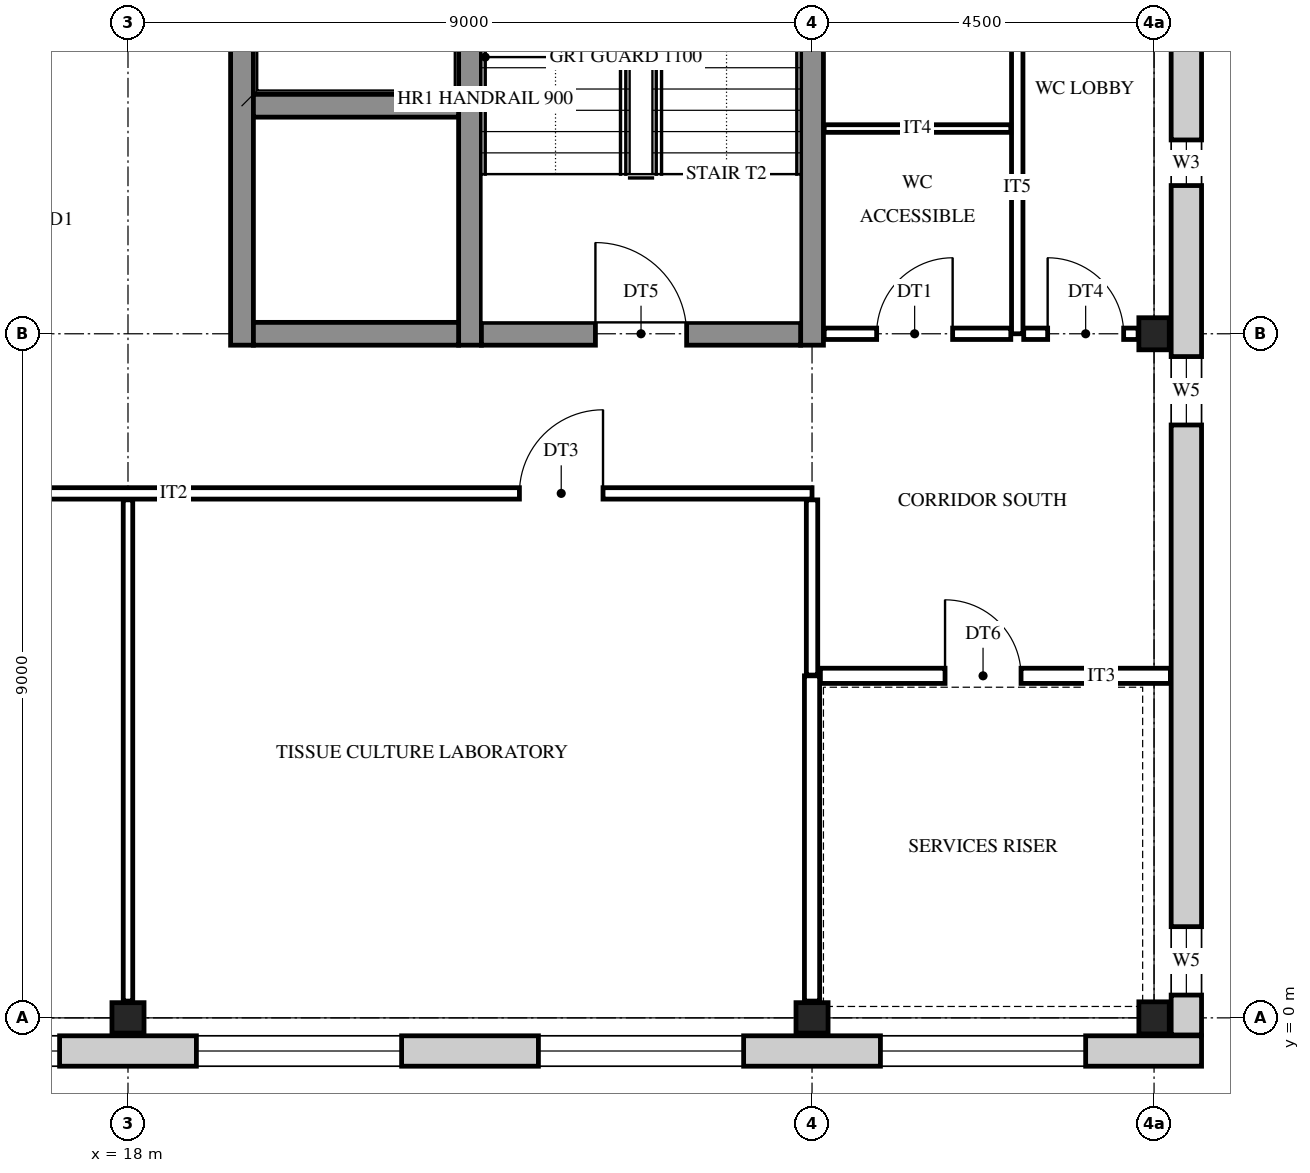
"""IFC4 building model, lengths in metres.
Left out: names, types, materials, properties, quantities, classifications, styles, units other than length and angle.
Written with IfcOpenShell. Run it as: python <this file> out.ifc"""

import sys

from ifc_helpers import new_model, si_unit, direction, frame, frame_2d, origin, origin_2d, place, context, subcontext, project, spatial, rectangle, i_section, extrude, element, fill, save


model = new_model("IFC4")
c1 = context("Model", 3, precision=1e-05, world=origin(), true_north=direction((0.0, 1.0)))
c2 = subcontext(c1, "Body", "Model", "MODEL_VIEW")
j1 = project(units=[si_unit("LENGTHUNIT", "METRE"), si_unit("PLANEANGLEUNIT", "RADIAN")], contexts=[c1])
p1 = place(None, origin())
s1 = spatial("IfcSite", under=j1, at=p1, CompositionType="ELEMENT")
p2 = place(p1, origin())
s2 = spatial("IfcBuilding", under=s1, at=p2, CompositionType="ELEMENT")
p3 = place(p2, frame((0.0, 0.0, 15.0)))
s3 = spatial("IfcBuildingStorey", under=s2, at=p3, CompositionType="ELEMENT", Elevation=15.0)
for number, where, z_axis, x_axis in (
    (1, (18.0, 0.0, 0.0), (0.0, 0.0, 1.0), (0.0, 1.0, 0.0)),
    (2, (27.0, 0.0, 0.0), (0.0, 0.0, 1.0), (0.0, 1.0, 0.0)),
    (3, (31.5, 0.0, 0.0), (0.0, 0.0, 1.0), (1.0, 0.0, 0.0)),
    (4, (31.5, 9.0, 0.0), (0.0, 0.0, 1.0), (1.0, 0.0, 0.0)),
):
    element("IfcColumn", number, at=place(p3, frame(where, z_axis=z_axis, x_axis=x_axis)), inside=s3, PredefinedType="COLUMN", context=c2, shape_type="SweptSolid", body=[
        extrude(i_section(OverallWidth=0.4, OverallDepth=0.422, WebThickness=0.028, FlangeThickness=0.036, at=origin_2d()), origin(), (0.0, 0.0, 1.0), 4.2),
    ])
p4 = place(p3, frame((19.5, 8.85, 0.0), z_axis=(0.0, 0.0, 1.0), x_axis=(0.0, 1.0, 0.0)))
e5 = element("IfcWall", 5, at=p4, inside=s3, PredefinedType="SHEAR", context=c2, shape_type="SweptSolid", body=[
    extrude(rectangle(XDim=9.3, YDim=0.3, at=frame_2d((4.65, 0.0))), origin(), (0.0, 0.0, 1.0), 4.2),
])
p5 = place(p4, frame((3.95, 0.0, 0.0)))
e6 = element("IfcOpeningElement", 6, at=p5, cuts=e5, PredefinedType="OPENING", context=c2, shape_type="SweptSolid", body=[
    extrude(rectangle(XDim=1.4, YDim=2.1, at=frame_2d((0.7, 1.05))), frame((0.0, 0.16, 0.0), z_axis=(0.0, -1.0, 0.0), x_axis=(1.0, 0.0, 0.0)), (0.0, 0.0, 1.0), 0.32),
])
p6 = place(p4, frame((7.1, 0.0, 0.0)))
e7 = element("IfcOpeningElement", 7, at=p6, cuts=e5, PredefinedType="OPENING", context=c2, shape_type="SweptSolid", body=[
    extrude(rectangle(XDim=1.1, YDim=2.1, at=frame_2d((0.55, 1.05))), frame((0.0, 0.16, 0.0), z_axis=(0.0, -1.0, 0.0), x_axis=(1.0, 0.0, 0.0)), (0.0, 0.0, 1.0), 0.32),
])
for number, where, z_axis, x_axis in (
    (8, (22.5, 8.85, 0.0), (0.0, 0.0, 1.0), (0.0, 1.0, 0.0)),
    (9, (27.0, 8.85, 0.0), (0.0, 0.0, 1.0), (0.0, 1.0, 0.0)),
):
    element("IfcWall", number, at=place(p3, frame(where, z_axis=z_axis, x_axis=x_axis)), inside=s3, PredefinedType="SHEAR", context=c2, shape_type="SweptSolid", body=[
        extrude(rectangle(XDim=9.3, YDim=0.3, at=frame_2d((4.65, 0.0))), origin(), (0.0, 0.0, 1.0), 4.2),
    ])
p7 = place(p3, frame((19.65, 9.0, 0.0), z_axis=(0.0, 0.0, 1.0), x_axis=(1.0, 0.0, 0.0)))
e10 = element("IfcWall", 10, at=p7, inside=s3, PredefinedType="SHEAR", context=c2, shape_type="SweptSolid", body=[
    extrude(rectangle(XDim=2.7, YDim=0.3, at=frame_2d((1.35, 0.0))), origin(), (0.0, 0.0, 1.0), 4.2),
])
p8 = place(p3, frame((22.65, 9.0, 0.0), z_axis=(0.0, 0.0, 1.0), x_axis=(1.0, 0.0, 0.0)))
e11 = element("IfcWall", 11, at=p8, inside=s3, PredefinedType="SHEAR", context=c2, shape_type="SweptSolid", body=[
    extrude(rectangle(XDim=4.2, YDim=0.3, at=frame_2d((2.1, 0.0))), origin(), (0.0, 0.0, 1.0), 4.2),
])
p9 = place(p8, frame((1.5, 0.0, 0.0)))
e12 = element("IfcOpeningElement", 12, at=p9, cuts=e11, PredefinedType="OPENING", context=c2, shape_type="SweptSolid", body=[
    extrude(rectangle(XDim=1.2, YDim=2.1, at=frame_2d((0.6, 1.05))), frame((0.0, 0.16, 0.0), z_axis=(0.0, -1.0, 0.0), x_axis=(1.0, 0.0, 0.0)), (0.0, 0.0, 1.0), 0.32),
])
p10 = place(p3, frame((19.65, 12.0, 0.0), z_axis=(0.0, 0.0, 1.0), x_axis=(1.0, 0.0, 0.0)))
e13 = element("IfcWall", 13, at=p10, inside=s3, PredefinedType="SHEAR", context=c2, shape_type="SweptSolid", body=[
    extrude(rectangle(XDim=2.7, YDim=0.3, at=frame_2d((1.35, 0.0))), origin(), (0.0, 0.0, 1.0), 4.2),
])
p11 = place(p3, frame((32.125, -0.436, 0.0), z_axis=(0.0, 0.0, 1.0), x_axis=(-1.0, 0.0, 0.0)))
e14 = element("IfcWall", 14, at=p11, inside=s3, PredefinedType="STANDARD", context=c2, shape_type="SweptSolid", body=[
    extrude(rectangle(XDim=32.75, YDim=0.4, at=frame_2d((16.375, 0.0))), origin(), (0.0, 0.0, 1.0), 4.2),
])
p12 = place(p11, frame((28.525, 0.0, 0.9)))
e15 = element("IfcOpeningElement", 15, at=p12, cuts=e14, PredefinedType="OPENING", context=c2, shape_type="SweptSolid", body=[
    extrude(rectangle(XDim=2.7, YDim=2.5, at=frame_2d((1.35, 1.25))), frame((0.0, 0.21, 0.0), z_axis=(0.0, -1.0, 0.0), x_axis=(1.0, 0.0, 0.0)), (0.0, 0.0, 1.0), 0.42),
])
p13 = place(p11, frame((24.025, 0.0, 0.9)))
e16 = element("IfcOpeningElement", 16, at=p13, cuts=e14, PredefinedType="OPENING", context=c2, shape_type="SweptSolid", body=[
    extrude(rectangle(XDim=2.7, YDim=2.5, at=frame_2d((1.35, 1.25))), frame((0.0, 0.21, 0.0), z_axis=(0.0, -1.0, 0.0), x_axis=(1.0, 0.0, 0.0)), (0.0, 0.0, 1.0), 0.42),
])
p14 = place(p11, frame((19.525, 0.0, 0.9)))
e17 = element("IfcOpeningElement", 17, at=p14, cuts=e14, PredefinedType="OPENING", context=c2, shape_type="SweptSolid", body=[
    extrude(rectangle(XDim=2.7, YDim=2.5, at=frame_2d((1.35, 1.25))), frame((0.0, 0.21, 0.0), z_axis=(0.0, -1.0, 0.0), x_axis=(1.0, 0.0, 0.0)), (0.0, 0.0, 1.0), 0.42),
])
p15 = place(p11, frame((15.025, 0.0, 0.9)))
e18 = element("IfcOpeningElement", 18, at=p15, cuts=e14, PredefinedType="OPENING", context=c2, shape_type="SweptSolid", body=[
    extrude(rectangle(XDim=2.7, YDim=2.5, at=frame_2d((1.35, 1.25))), frame((0.0, 0.21, 0.0), z_axis=(0.0, -1.0, 0.0), x_axis=(1.0, 0.0, 0.0)), (0.0, 0.0, 1.0), 0.42),
])
p16 = place(p11, frame((10.525, 0.0, 0.9)))
e19 = element("IfcOpeningElement", 19, at=p16, cuts=e14, PredefinedType="OPENING", context=c2, shape_type="SweptSolid", body=[
    extrude(rectangle(XDim=2.7, YDim=2.5, at=frame_2d((1.35, 1.25))), frame((0.0, 0.21, 0.0), z_axis=(0.0, -1.0, 0.0), x_axis=(1.0, 0.0, 0.0)), (0.0, 0.0, 1.0), 0.42),
])
p17 = place(p11, frame((6.025, 0.0, 0.9)))
e20 = element("IfcOpeningElement", 20, at=p17, cuts=e14, PredefinedType="OPENING", context=c2, shape_type="SweptSolid", body=[
    extrude(rectangle(XDim=2.7, YDim=2.5, at=frame_2d((1.35, 1.25))), frame((0.0, 0.21, 0.0), z_axis=(0.0, -1.0, 0.0), x_axis=(1.0, 0.0, 0.0)), (0.0, 0.0, 1.0), 0.42),
])
p18 = place(p11, frame((1.525, 0.0, 0.9)))
e21 = element("IfcOpeningElement", 21, at=p18, cuts=e14, PredefinedType="OPENING", context=c2, shape_type="SweptSolid", body=[
    extrude(rectangle(XDim=2.7, YDim=2.5, at=frame_2d((1.35, 1.25))), frame((0.0, 0.21, 0.0), z_axis=(0.0, -1.0, 0.0), x_axis=(1.0, 0.0, 0.0)), (0.0, 0.0, 1.0), 0.42),
])
p19 = place(p3, frame((31.925, 27.225, 0.0), z_axis=(0.0, 0.0, 1.0), x_axis=(0.0, -1.0, 0.0)))
e22 = element("IfcWall", 22, at=p19, inside=s3, PredefinedType="STANDARD", context=c2, shape_type="SweptSolid", body=[
    extrude(rectangle(XDim=27.45, YDim=0.4, at=frame_2d((13.725, 0.0))), origin(), (0.0, 0.0, 1.0), 4.2),
])
p20 = place(p19, frame((26.025, 0.0, 0.9)))
e23 = element("IfcOpeningElement", 23, at=p20, cuts=e22, PredefinedType="OPENING", context=c2, shape_type="SweptSolid", body=[
    extrude(rectangle(XDim=0.9, YDim=2.0, at=frame_2d((0.45, 1.0))), frame((0.0, 0.21, 0.0), z_axis=(0.0, -1.0, 0.0), x_axis=(1.0, 0.0, 0.0)), (0.0, 0.0, 1.0), 0.42),
])
p21 = place(p19, frame((18.525, 0.0, 0.9)))
e24 = element("IfcOpeningElement", 24, at=p21, cuts=e22, PredefinedType="OPENING", context=c2, shape_type="SweptSolid", body=[
    extrude(rectangle(XDim=0.9, YDim=2.0, at=frame_2d((0.45, 1.0))), frame((0.0, 0.21, 0.0), z_axis=(0.0, -1.0, 0.0), x_axis=(1.0, 0.0, 0.0)), (0.0, 0.0, 1.0), 0.42),
])
p22 = place(p19, frame((15.675, 0.0, 1.6)))
e25 = element("IfcOpeningElement", 25, at=p22, cuts=e22, PredefinedType="OPENING", context=c2, shape_type="SweptSolid", body=[
    extrude(rectangle(XDim=0.6, YDim=0.9, at=frame_2d((0.3, 0.45))), frame((0.0, 0.21, 0.0), z_axis=(0.0, -1.0, 0.0), x_axis=(1.0, 0.0, 0.0)), (0.0, 0.0, 1.0), 0.42),
])
p23 = place(p19, frame((11.175, 0.0, 1.6)))
e26 = element("IfcOpeningElement", 26, at=p23, cuts=e22, PredefinedType="OPENING", context=c2, shape_type="SweptSolid", body=[
    extrude(rectangle(XDim=0.6, YDim=0.9, at=frame_2d((0.3, 0.45))), frame((0.0, 0.21, 0.0), z_axis=(0.0, -1.0, 0.0), x_axis=(1.0, 0.0, 0.0)), (0.0, 0.0, 1.0), 0.42),
])
p24 = place(p19, frame((8.025, 0.0, 0.9)))
e27 = element("IfcOpeningElement", 27, at=p24, cuts=e22, PredefinedType="OPENING", context=c2, shape_type="SweptSolid", body=[
    extrude(rectangle(XDim=0.9, YDim=2.0, at=frame_2d((0.45, 1.0))), frame((0.0, 0.21, 0.0), z_axis=(0.0, -1.0, 0.0), x_axis=(1.0, 0.0, 0.0)), (0.0, 0.0, 1.0), 0.42),
])
p25 = place(p19, frame((0.525, 0.0, 0.9)))
e28 = element("IfcOpeningElement", 28, at=p25, cuts=e22, PredefinedType="OPENING", context=c2, shape_type="SweptSolid", body=[
    extrude(rectangle(XDim=0.9, YDim=2.0, at=frame_2d((0.45, 1.0))), frame((0.0, 0.21, 0.0), z_axis=(0.0, -1.0, 0.0), x_axis=(1.0, 0.0, 0.0)), (0.0, 0.0, 1.0), 0.42),
])
p26 = place(p3, frame((18.0, 0.221, 0.0), z_axis=(0.0, 0.0, 1.0), x_axis=(0.0, 1.0, 0.0)))
e29 = element("IfcWall", 29, at=p26, inside=s3, PredefinedType="PARTITIONING", context=c2, shape_type="SweptSolid", body=[
    extrude(rectangle(XDim=6.594, YDim=0.125, at=frame_2d((3.297, 0.0))), origin(), (0.0, 0.0, 1.0), 3.537),
])
p27 = place(p3, frame((27.0, 0.221, 0.0), z_axis=(0.0, 0.0, 1.0), x_axis=(0.0, 1.0, 0.0)))
e30 = element("IfcWall", 30, at=p27, inside=s3, PredefinedType="PARTITIONING", context=c2, shape_type="SweptSolid", body=[
    extrude(rectangle(XDim=4.279, YDim=0.2, at=frame_2d((2.14, 0.0))), origin(), (0.0, 0.0, 1.0), 3.537),
])
p28 = place(p3, frame((27.0, 4.51, 0.0), z_axis=(0.0, 0.0, 1.0), x_axis=(0.0, 1.0, 0.0)))
e31 = element("IfcWall", 31, at=p28, inside=s3, PredefinedType="PARTITIONING", context=c2, shape_type="SweptSolid", body=[
    extrude(rectangle(XDim=2.305, YDim=0.15, at=frame_2d((1.152, 0.0))), origin(), (0.0, 0.0, 1.0), 3.537),
])
p29 = place(p3, frame((29.7, 9.0, 0.0), z_axis=(0.0, 0.0, 1.0), x_axis=(0.0, 1.0, 0.0)))
e32 = element("IfcWall", 32, at=p29, inside=s3, PredefinedType="PARTITIONING", context=c2, shape_type="SweptSolid", body=[
    extrude(rectangle(XDim=6.3, YDim=0.15, at=frame_2d((3.15, 0.0))), origin(), (0.0, 0.0, 1.0), 3.537),
])
p30 = place(p29, frame((4.0, 0.0, 0.0)))
e33 = element("IfcOpeningElement", 33, at=p30, cuts=e32, PredefinedType="OPENING", context=c2, shape_type="SweptSolid", body=[
    extrude(rectangle(XDim=1.0, YDim=2.1, at=frame_2d((0.5, 1.05))), frame((0.0, 0.085, 0.0), z_axis=(0.0, -1.0, 0.0), x_axis=(1.0, 0.0, 0.0)), (0.0, 0.0, 1.0), 0.17),
])
p31 = place(p3, frame((27.11, 4.5, 0.0), z_axis=(0.0, 0.0, 1.0), x_axis=(1.0, 0.0, 0.0)))
e34 = element("IfcWall", 34, at=p31, inside=s3, PredefinedType="PARTITIONING", context=c2, shape_type="SweptSolid", body=[
    extrude(rectangle(XDim=4.605, YDim=0.2, at=frame_2d((2.302, 0.0))), origin(), (0.0, 0.0, 1.0), 3.537),
])
p32 = place(p31, frame((1.64, 0.0, 0.0)))
e35 = element("IfcOpeningElement", 35, at=p32, cuts=e34, PredefinedType="OPENING", context=c2, shape_type="SweptSolid", body=[
    extrude(rectangle(XDim=1.0, YDim=2.1, at=frame_2d((0.5, 1.05))), frame((0.0, 0.11, 0.0), z_axis=(0.0, -1.0, 0.0), x_axis=(1.0, 0.0, 0.0)), (0.0, 0.0, 1.0), 0.22),
])
p33 = place(p3, frame((6.9, 6.9, 0.0), z_axis=(0.0, 0.0, 1.0), x_axis=(1.0, 0.0, 0.0)))
e36 = element("IfcWall", 36, at=p33, inside=s3, PredefinedType="PARTITIONING", context=c2, shape_type="SweptSolid", body=[
    extrude(rectangle(XDim=20.1, YDim=0.15, at=frame_2d((10.05, 0.0))), origin(), (0.0, 0.0, 1.0), 3.537),
])
p34 = place(p33, frame((0.15, 0.0, 0.0)))
e37 = element("IfcOpeningElement", 37, at=p34, cuts=e36, PredefinedType="OPENING", context=c2, shape_type="SweptSolid", body=[
    extrude(rectangle(XDim=1.1, YDim=2.1, at=frame_2d((0.55, 1.05))), frame((0.0, 0.085, 0.0), z_axis=(0.0, -1.0, 0.0), x_axis=(1.0, 0.0, 0.0)), (0.0, 0.0, 1.0), 0.17),
])
p35 = place(p33, frame((6.05, 0.0, 0.0)))
e38 = element("IfcOpeningElement", 38, at=p35, cuts=e36, PredefinedType="OPENING", context=c2, shape_type="SweptSolid", body=[
    extrude(rectangle(XDim=1.1, YDim=2.1, at=frame_2d((0.55, 1.05))), frame((0.0, 0.085, 0.0), z_axis=(0.0, -1.0, 0.0), x_axis=(1.0, 0.0, 0.0)), (0.0, 0.0, 1.0), 0.17),
])
p36 = place(p33, frame((16.25, 0.0, 0.0)))
e39 = element("IfcOpeningElement", 39, at=p36, cuts=e36, PredefinedType="OPENING", context=c2, shape_type="SweptSolid", body=[
    extrude(rectangle(XDim=1.1, YDim=2.1, at=frame_2d((0.55, 1.05))), frame((0.0, 0.085, 0.0), z_axis=(0.0, -1.0, 0.0), x_axis=(1.0, 0.0, 0.0)), (0.0, 0.0, 1.0), 0.17),
])
p37 = place(p3, frame((27.16, 9.0, 0.0), z_axis=(0.0, 0.0, 1.0), x_axis=(1.0, 0.0, 0.0)))
e40 = element("IfcWall", 40, at=p37, inside=s3, PredefinedType="PARTITIONING", context=c2, shape_type="SweptSolid", body=[
    extrude(rectangle(XDim=2.455, YDim=0.15, at=frame_2d((1.228, 0.0))), origin(), (0.0, 0.0, 1.0), 3.537),
])
p38 = place(p37, frame((0.69, 0.0, 0.0)))
e41 = element("IfcOpeningElement", 41, at=p38, cuts=e40, PredefinedType="OPENING", context=c2, shape_type="SweptSolid", body=[
    extrude(rectangle(XDim=1.0, YDim=2.1, at=frame_2d((0.5, 1.05))), frame((0.0, 0.085, 0.0), z_axis=(0.0, -1.0, 0.0), x_axis=(1.0, 0.0, 0.0)), (0.0, 0.0, 1.0), 0.17),
])
p39 = place(p3, frame((29.785, 9.0, 0.0), z_axis=(0.0, 0.0, 1.0), x_axis=(1.0, 0.0, 0.0)))
e42 = element("IfcWall", 42, at=p39, inside=s3, PredefinedType="PARTITIONING", context=c2, shape_type="SweptSolid", body=[
    extrude(rectangle(XDim=1.505, YDim=0.15, at=frame_2d((0.752, 0.0))), origin(), (0.0, 0.0, 1.0), 3.537),
])
p40 = place(p39, frame((0.315, 0.0, 0.0)))
e43 = element("IfcOpeningElement", 43, at=p40, cuts=e42, PredefinedType="OPENING", context=c2, shape_type="SweptSolid", body=[
    extrude(rectangle(XDim=1.0, YDim=2.1, at=frame_2d((0.5, 1.05))), frame((0.0, 0.085, 0.0), z_axis=(0.0, -1.0, 0.0), x_axis=(1.0, 0.0, 0.0)), (0.0, 0.0, 1.0), 0.17),
])
p41 = place(p3, frame((27.16, 11.7, 0.0), z_axis=(0.0, 0.0, 1.0), x_axis=(1.0, 0.0, 0.0)))
e44 = element("IfcWall", 44, at=p41, inside=s3, PredefinedType="PARTITIONING", context=c2, shape_type="SweptSolid", body=[
    extrude(rectangle(XDim=2.455, YDim=0.1, at=frame_2d((1.228, 0.0))), origin(), (0.0, 0.0, 1.0), 3.537),
])
p42 = place(p15, origin())
e45 = element("IfcWindow", 45, at=p42, inside=s3, PartitioningType="SINGLE_PANEL", PredefinedType="WINDOW", context=c2, shape_type="SweptSolid", body=[
    extrude(rectangle(XDim=2.7, YDim=2.5, at=frame_2d((1.35, 1.25))), frame((0.0, 0.03, 0.0), z_axis=(0.0, -1.0, 0.0), x_axis=(1.0, 0.0, 0.0)), (0.0, 0.0, 1.0), 0.06),
])
fill(e18, e45)
p43 = place(p16, origin())
e46 = element("IfcWindow", 46, at=p43, inside=s3, PartitioningType="SINGLE_PANEL", PredefinedType="WINDOW", context=c2, shape_type="SweptSolid", body=[
    extrude(rectangle(XDim=2.7, YDim=2.5, at=frame_2d((1.35, 1.25))), frame((0.0, 0.03, 0.0), z_axis=(0.0, -1.0, 0.0), x_axis=(1.0, 0.0, 0.0)), (0.0, 0.0, 1.0), 0.06),
])
fill(e19, e46)
p44 = place(p17, origin())
e47 = element("IfcWindow", 47, at=p44, inside=s3, PartitioningType="SINGLE_PANEL", PredefinedType="WINDOW", context=c2, shape_type="SweptSolid", body=[
    extrude(rectangle(XDim=2.7, YDim=2.5, at=frame_2d((1.35, 1.25))), frame((0.0, 0.03, 0.0), z_axis=(0.0, -1.0, 0.0), x_axis=(1.0, 0.0, 0.0)), (0.0, 0.0, 1.0), 0.06),
])
fill(e20, e47)
p45 = place(p18, origin())
e48 = element("IfcWindow", 48, at=p45, inside=s3, PartitioningType="SINGLE_PANEL", PredefinedType="WINDOW", context=c2, shape_type="SweptSolid", body=[
    extrude(rectangle(XDim=2.7, YDim=2.5, at=frame_2d((1.35, 1.25))), frame((0.0, 0.03, 0.0), z_axis=(0.0, -1.0, 0.0), x_axis=(1.0, 0.0, 0.0)), (0.0, 0.0, 1.0), 0.06),
])
fill(e21, e48)
p46 = place(p20, origin())
e49 = element("IfcWindow", 49, at=p46, inside=s3, PartitioningType="SINGLE_PANEL", PredefinedType="WINDOW", context=c2, shape_type="SweptSolid", body=[
    extrude(rectangle(XDim=0.9, YDim=2.0, at=frame_2d((0.45, 1.0))), frame((0.0, 0.03, 0.0), z_axis=(0.0, -1.0, 0.0), x_axis=(1.0, 0.0, 0.0)), (0.0, 0.0, 1.0), 0.06),
])
fill(e23, e49)
p47 = place(p21, origin())
e50 = element("IfcWindow", 50, at=p47, inside=s3, PartitioningType="SINGLE_PANEL", PredefinedType="WINDOW", context=c2, shape_type="SweptSolid", body=[
    extrude(rectangle(XDim=0.9, YDim=2.0, at=frame_2d((0.45, 1.0))), frame((0.0, 0.03, 0.0), z_axis=(0.0, -1.0, 0.0), x_axis=(1.0, 0.0, 0.0)), (0.0, 0.0, 1.0), 0.06),
])
fill(e24, e50)
p48 = place(p22, origin())
e51 = element("IfcWindow", 51, at=p48, inside=s3, PartitioningType="SINGLE_PANEL", PredefinedType="WINDOW", context=c2, shape_type="SweptSolid", body=[
    extrude(rectangle(XDim=0.6, YDim=0.9, at=frame_2d((0.3, 0.45))), frame((0.0, 0.03, 0.0), z_axis=(0.0, -1.0, 0.0), x_axis=(1.0, 0.0, 0.0)), (0.0, 0.0, 1.0), 0.06),
])
fill(e25, e51)
p49 = place(p9, origin())
e52 = element("IfcDoor", 52, at=p49, inside=s3, OperationType="SINGLE_SWING_LEFT", PredefinedType="DOOR", context=c2, shape_type="SweptSolid", body=[
    extrude(rectangle(XDim=1.2, YDim=2.1, at=frame_2d((0.6, 1.05))), frame((0.0, 0.025, 0.0), z_axis=(0.0, -1.0, 0.0), x_axis=(1.0, 0.0, 0.0)), (0.0, 0.0, 1.0), 0.05),
])
fill(e12, e52)
p50 = place(p38, origin())
e53 = element("IfcDoor", 53, at=p50, inside=s3, OperationType="SINGLE_SWING_RIGHT", PredefinedType="DOOR", context=c2, shape_type="SweptSolid", body=[
    extrude(rectangle(XDim=1.0, YDim=2.1, at=frame_2d((0.5, 1.05))), frame((0.0, 0.025, 0.0), z_axis=(0.0, -1.0, 0.0), x_axis=(1.0, 0.0, 0.0)), (0.0, 0.0, 1.0), 0.05),
])
fill(e41, e53)
p51 = place(p40, origin())
e54 = element("IfcDoor", 54, at=p51, inside=s3, OperationType="SINGLE_SWING_LEFT", PredefinedType="DOOR", context=c2, shape_type="SweptSolid", body=[
    extrude(rectangle(XDim=1.0, YDim=2.1, at=frame_2d((0.5, 1.05))), frame((0.0, 0.025, 0.0), z_axis=(0.0, -1.0, 0.0), x_axis=(1.0, 0.0, 0.0)), (0.0, 0.0, 1.0), 0.05),
])
fill(e43, e54)
p52 = place(p32, frame((1.0, 0.0, 0.0), z_axis=(0.0, 0.0, 1.0), x_axis=(-1.0, 0.0, 0.0)))
e55 = element("IfcDoor", 55, at=p52, inside=s3, OperationType="SINGLE_SWING_LEFT", PredefinedType="DOOR", context=c2, shape_type="SweptSolid", body=[
    extrude(rectangle(XDim=1.0, YDim=2.1, at=frame_2d((0.5, 1.05))), frame((0.0, 0.025, 0.0), z_axis=(0.0, -1.0, 0.0), x_axis=(1.0, 0.0, 0.0)), (0.0, 0.0, 1.0), 0.05),
])
fill(e35, e55)
p53 = place(p36, frame((1.1, 0.0, 0.0), z_axis=(0.0, 0.0, 1.0), x_axis=(-1.0, 0.0, 0.0)))
e56 = element("IfcDoor", 56, at=p53, inside=s3, OperationType="SINGLE_SWING_RIGHT", PredefinedType="DOOR", context=c2, shape_type="SweptSolid", body=[
    extrude(rectangle(XDim=1.1, YDim=2.1, at=frame_2d((0.55, 1.05))), frame((0.0, 0.025, 0.0), z_axis=(0.0, -1.0, 0.0), x_axis=(1.0, 0.0, 0.0)), (0.0, 0.0, 1.0), 0.05),
])
fill(e39, e56)
save(model, sys.argv[1])
